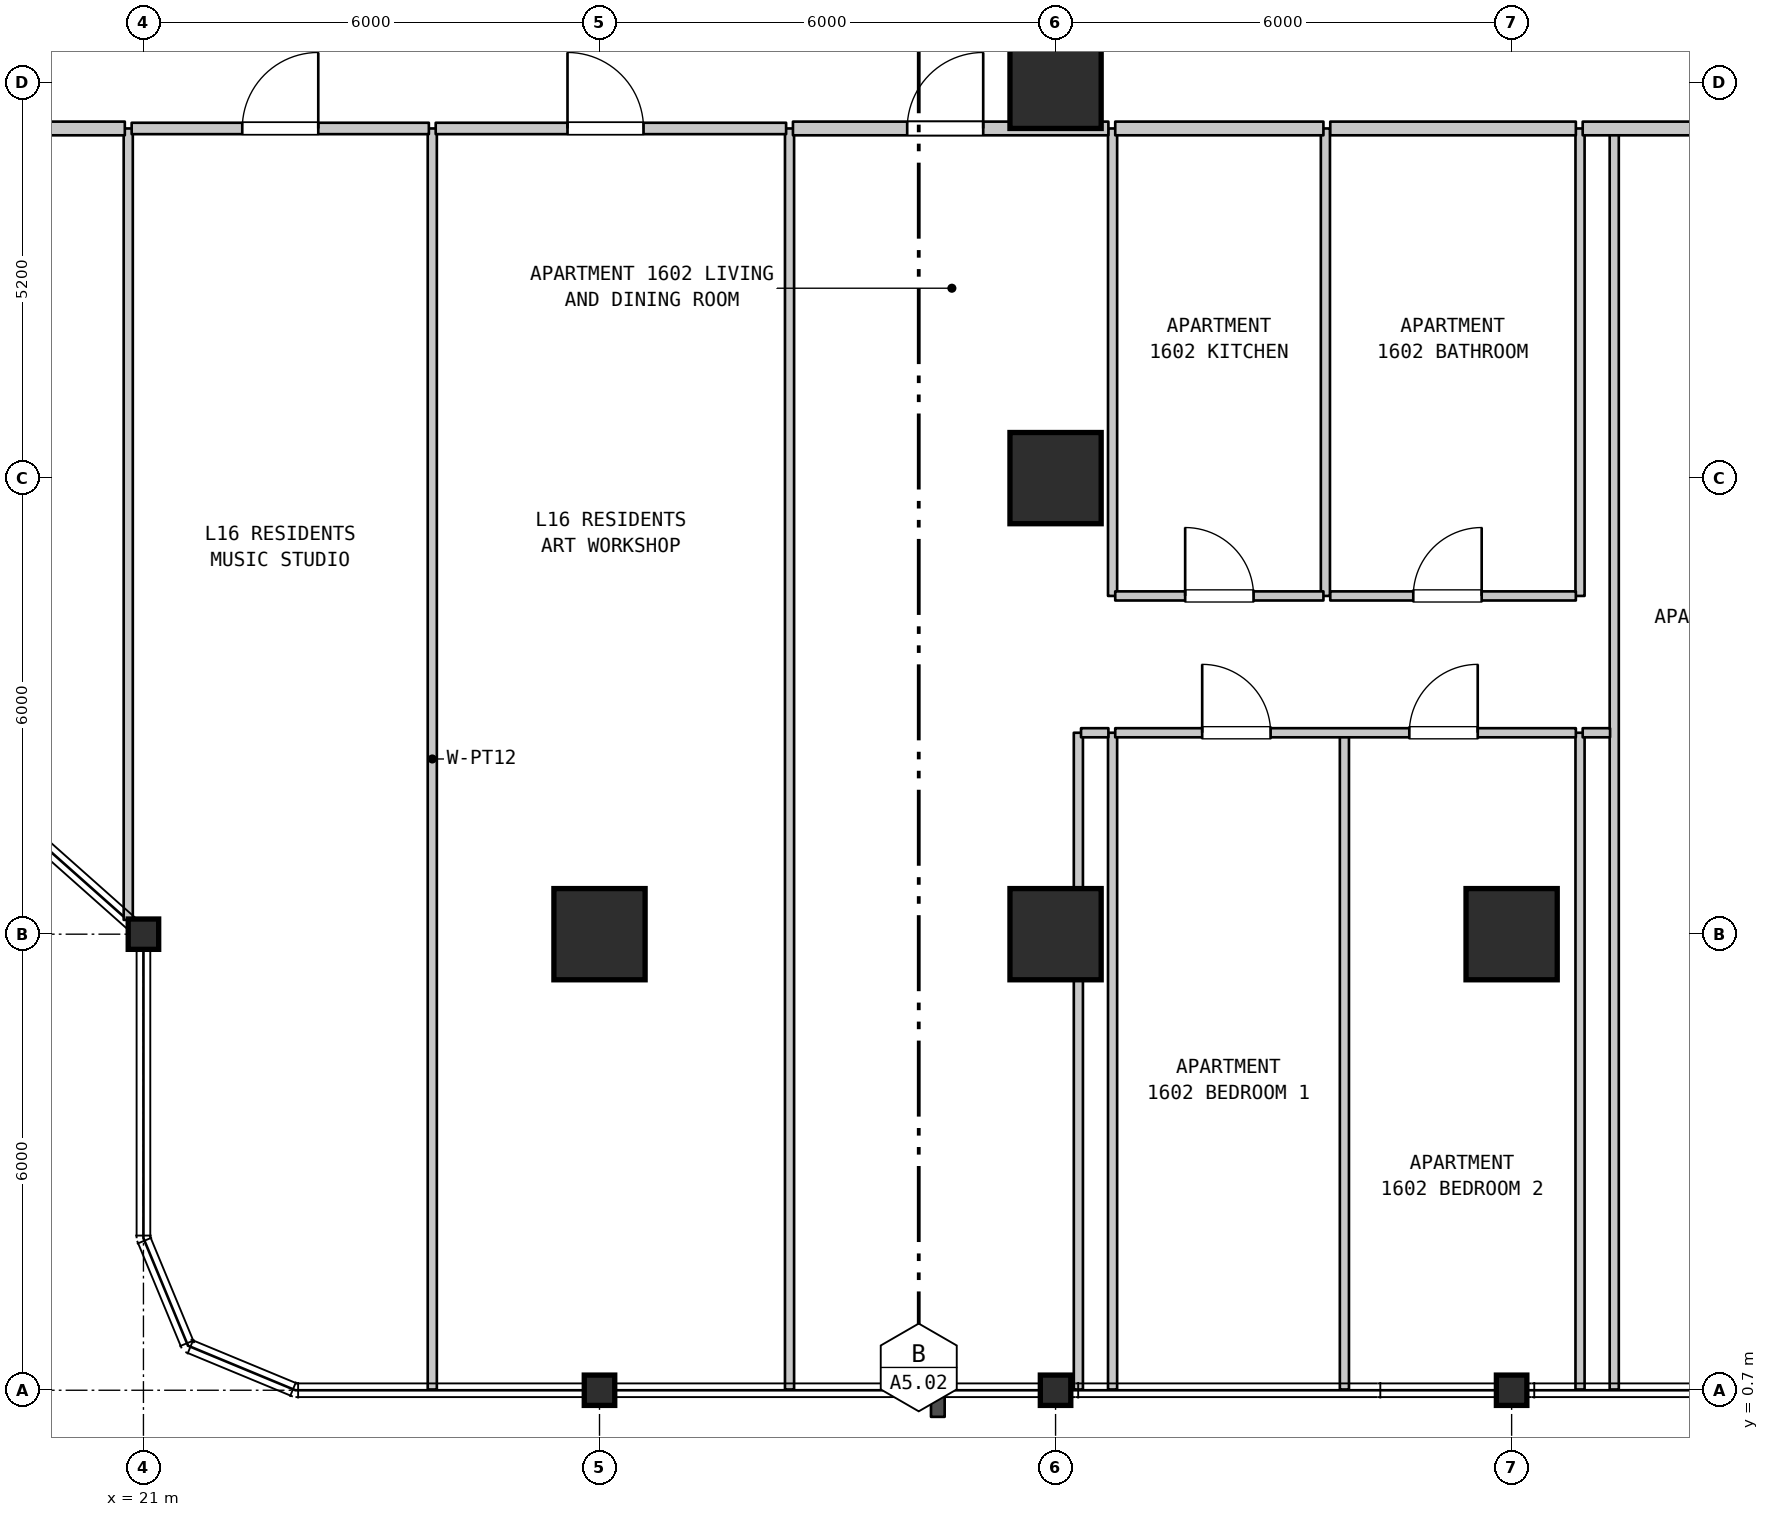
"""IFC4 building model, lengths in metres.
Left out: names, types, materials, properties, quantities, classifications, styles, units other than length and angle.
Written with IfcOpenShell. Run it as: python <this file> out.ifc"""

import sys

from ifc_helpers import new_model, si_unit, direction, frame, frame_2d, origin, origin_2d, place, context, subcontext, project, spatial, rectangle, i_section, extrude, element, fill, save


model = new_model("IFC4")
c1 = context("Model", 3, precision=1e-05, world=origin(), true_north=direction((0.0, 1.0)))
c2 = subcontext(c1, "Body", "Model", "MODEL_VIEW")
j1 = project(units=[si_unit("LENGTHUNIT", "METRE"), si_unit("PLANEANGLEUNIT", "RADIAN")], contexts=[c1])
p1 = place(None, origin())
s1 = spatial("IfcSite", under=j1, at=p1, CompositionType="ELEMENT")
p2 = place(p1, origin())
s2 = spatial("IfcBuilding", under=s1, at=p2, CompositionType="ELEMENT")
p3 = place(p2, frame((0.0, 0.0, 70.1)))
s3 = spatial("IfcBuildingStorey", under=s2, at=p3, CompositionType="ELEMENT", Elevation=70.1)
for number, where, z_axis, x_axis in (
    (1, (21.0, 6.7, 0.0), (0.0, 0.0, 1.0), (1.0, 0.0, 0.0)),
    (2, (27.0, 0.7, 0.0), (0.0, 0.0, 1.0), (1.0, 0.0, 0.0)),
):
    element("IfcColumn", number, at=place(p3, frame(where, z_axis=z_axis, x_axis=x_axis)), inside=s3, PredefinedType="COLUMN", context=c2, shape_type="SweptSolid", body=[
        extrude(i_section(OverallWidth=0.401, OverallDepth=0.399, WebThickness=0.025, FlangeThickness=0.04, FilletRadius=0.015, at=origin_2d()), origin(), (0.0, 0.0, 1.0), 3.7),
    ])
p4 = place(p3, frame((27.0, 6.7, 0.0), z_axis=(0.0, 0.0, 1.0), x_axis=(1.0, 0.0, 0.0)))
e3 = element("IfcColumn", 3, at=p4, inside=s3, PredefinedType="COLUMN", context=c2, shape_type="SweptSolid", body=[
    extrude(rectangle(XDim=1.2, YDim=1.2, at=origin_2d()), origin(), (0.0, 0.0, 1.0), 3.7),
])
p5 = place(p3, frame((33.0, 0.7, 0.0), z_axis=(0.0, 0.0, 1.0), x_axis=(1.0, 0.0, 0.0)))
e4 = element("IfcColumn", 4, at=p5, inside=s3, PredefinedType="COLUMN", context=c2, shape_type="SweptSolid", body=[
    extrude(i_section(OverallWidth=0.401, OverallDepth=0.399, WebThickness=0.025, FlangeThickness=0.04, FilletRadius=0.015, at=origin_2d()), origin(), (0.0, 0.0, 1.0), 3.7),
])
for number, where, z_axis, x_axis in (
    (5, (33.0, 6.7, 0.0), (0.0, 0.0, 1.0), (1.0, 0.0, 0.0)),
    (6, (33.0, 12.7, 0.0), (0.0, 0.0, 1.0), (1.0, 0.0, 0.0)),
    (7, (33.0, 17.9, 0.0), (0.0, 0.0, 1.0), (1.0, 0.0, 0.0)),
):
    element("IfcColumn", number, at=place(p3, frame(where, z_axis=z_axis, x_axis=x_axis)), inside=s3, PredefinedType="COLUMN", context=c2, shape_type="SweptSolid", body=[
        extrude(rectangle(XDim=1.2, YDim=1.2, at=origin_2d()), origin(), (0.0, 0.0, 1.0), 3.7),
    ])
p6 = place(p3, frame((39.0, 0.7, 0.0), z_axis=(0.0, 0.0, 1.0), x_axis=(1.0, 0.0, 0.0)))
e8 = element("IfcColumn", 8, at=p6, inside=s3, PredefinedType="COLUMN", context=c2, shape_type="SweptSolid", body=[
    extrude(i_section(OverallWidth=0.401, OverallDepth=0.399, WebThickness=0.025, FlangeThickness=0.04, FilletRadius=0.015, at=origin_2d()), origin(), (0.0, 0.0, 1.0), 3.7),
])
p7 = place(p3, frame((39.0, 6.7, 0.0), z_axis=(0.0, 0.0, 1.0), x_axis=(1.0, 0.0, 0.0)))
e9 = element("IfcColumn", 9, at=p7, inside=s3, PredefinedType="COLUMN", context=c2, shape_type="SweptSolid", body=[
    extrude(rectangle(XDim=1.2, YDim=1.2, at=origin_2d()), origin(), (0.0, 0.0, 1.0), 3.7),
])
p8 = place(p3, frame((20.8, 6.888, 0.0), z_axis=(0.0, 0.0, 1.0), x_axis=(0.0, 1.0, 0.0)))
e10 = element("IfcWall", 10, at=p8, inside=s3, PredefinedType="PARTITIONING", context=c2, shape_type="SweptSolid", body=[
    extrude(rectangle(XDim=10.412, YDim=0.12, at=frame_2d((5.206, 0.0))), origin(), (0.0, 0.0, 1.0), 3.385),
])
for number, where, z_axis, x_axis in (
    (11, (24.8, 0.71, 0.0), (0.0, 0.0, 1.0), (0.0, 1.0, 0.0)),
    (12, (29.5, 0.71, 0.0), (0.0, 0.0, 1.0), (0.0, 1.0, 0.0)),
):
    element("IfcWall", number, at=place(p3, frame(where, z_axis=z_axis, x_axis=x_axis)), inside=s3, PredefinedType="PARTITIONING", context=c2, shape_type="SweptSolid", body=[
        extrude(rectangle(XDim=16.59, YDim=0.12, at=frame_2d((8.295, 0.0))), origin(), (0.0, 0.0, 1.0), 3.385),
    ])
for number, where, z_axis, x_axis in (
    (13, (33.3, 0.71, 0.0), (0.0, 0.0, 1.0), (0.0, 1.0, 0.0)),
    (14, (33.75, 0.71, 0.0), (0.0, 0.0, 1.0), (0.0, 1.0, 0.0)),
):
    element("IfcWall", number, at=place(p3, frame(where, z_axis=z_axis, x_axis=x_axis)), inside=s3, PredefinedType="PARTITIONING", context=c2, shape_type="SweptSolid", body=[
        extrude(rectangle(XDim=8.64, YDim=0.12, at=frame_2d((4.32, 0.0))), origin(), (0.0, 0.0, 1.0), 3.385),
    ])
for number, where, z_axis, x_axis in (
    (15, (33.75, 11.15, 0.0), (0.0, 0.0, 1.0), (0.0, 1.0, 0.0)),
    (16, (36.55, 11.15, 0.0), (0.0, 0.0, 1.0), (0.0, 1.0, 0.0)),
):
    element("IfcWall", number, at=place(p3, frame(where, z_axis=z_axis, x_axis=x_axis)), inside=s3, PredefinedType="PARTITIONING", context=c2, shape_type="SweptSolid", body=[
        extrude(rectangle(XDim=6.15, YDim=0.12, at=frame_2d((3.075, 0.0))), origin(), (0.0, 0.0, 1.0), 3.385),
    ])
for number, where, z_axis, x_axis in (
    (17, (36.8, 0.71, 0.0), (0.0, 0.0, 1.0), (0.0, 1.0, 0.0)),
    (18, (39.9, 0.71, 0.0), (0.0, 0.0, 1.0), (0.0, 1.0, 0.0)),
):
    element("IfcWall", number, at=place(p3, frame(where, z_axis=z_axis, x_axis=x_axis)), inside=s3, PredefinedType="PARTITIONING", context=c2, shape_type="SweptSolid", body=[
        extrude(rectangle(XDim=8.64, YDim=0.12, at=frame_2d((4.32, 0.0))), origin(), (0.0, 0.0, 1.0), 3.385),
    ])
p9 = place(p3, frame((39.9, 11.15, 0.0), z_axis=(0.0, 0.0, 1.0), x_axis=(0.0, 1.0, 0.0)))
e19 = element("IfcWall", 19, at=p9, inside=s3, PredefinedType="PARTITIONING", context=c2, shape_type="SweptSolid", body=[
    extrude(rectangle(XDim=6.15, YDim=0.12, at=frame_2d((3.075, 0.0))), origin(), (0.0, 0.0, 1.0), 3.385),
])
p10 = place(p3, frame((40.35, 0.71, 0.0), z_axis=(0.0, 0.0, 1.0), x_axis=(0.0, 1.0, 0.0)))
e20 = element("IfcWall", 20, at=p10, inside=s3, PredefinedType="PARTITIONING", context=c2, shape_type="SweptSolid", body=[
    extrude(rectangle(XDim=16.59, YDim=0.12, at=frame_2d((8.295, 0.0))), origin(), (0.0, 0.0, 1.0), 3.385),
])
p11 = place(p3, frame((33.335, 9.35, 0.0), z_axis=(0.0, 0.0, 1.0), x_axis=(1.0, 0.0, 0.0)))
e21 = element("IfcWall", 21, at=p11, inside=s3, PredefinedType="PARTITIONING", context=c2, shape_type="SweptSolid", body=[
    extrude(rectangle(XDim=0.36, YDim=0.12, at=frame_2d((0.18, 0.0))), origin(), (0.0, 0.0, 1.0), 3.385),
])
p12 = place(p3, frame((33.785, 9.35, 0.0), z_axis=(0.0, 0.0, 1.0), x_axis=(1.0, 0.0, 0.0)))
e22 = element("IfcWall", 22, at=p12, inside=s3, PredefinedType="PARTITIONING", context=c2, shape_type="SweptSolid", body=[
    extrude(rectangle(XDim=6.06, YDim=0.12, at=frame_2d((3.03, 0.0))), origin(), (0.0, 0.0, 1.0), 3.385),
])
p13 = place(p12, frame((1.144, 0.0, 0.0)))
e23 = element("IfcOpeningElement", 23, at=p13, cuts=e22, PredefinedType="OPENING", context=c2, shape_type="SweptSolid", body=[
    extrude(rectangle(XDim=0.9, YDim=2.15, at=frame_2d((0.45, 1.075))), frame((0.0, 0.07, 0.0), z_axis=(0.0, -1.0, 0.0), x_axis=(1.0, 0.0, 0.0)), (0.0, 0.0, 1.0), 0.14),
])
p14 = place(p12, frame((3.869, 0.0, 0.0)))
e24 = element("IfcOpeningElement", 24, at=p14, cuts=e22, PredefinedType="OPENING", context=c2, shape_type="SweptSolid", body=[
    extrude(rectangle(XDim=0.9, YDim=2.15, at=frame_2d((0.45, 1.075))), frame((0.0, 0.07, 0.0), z_axis=(0.0, -1.0, 0.0), x_axis=(1.0, 0.0, 0.0)), (0.0, 0.0, 1.0), 0.14),
])
p15 = place(p3, frame((39.935, 9.35, 0.0), z_axis=(0.0, 0.0, 1.0), x_axis=(1.0, 0.0, 0.0)))
e25 = element("IfcWall", 25, at=p15, inside=s3, PredefinedType="PARTITIONING", context=c2, shape_type="SweptSolid", body=[
    extrude(rectangle(XDim=0.36, YDim=0.12, at=frame_2d((0.18, 0.0))), origin(), (0.0, 0.0, 1.0), 3.385),
])
p16 = place(p3, frame((33.785, 11.15, 0.0), z_axis=(0.0, 0.0, 1.0), x_axis=(1.0, 0.0, 0.0)))
e26 = element("IfcWall", 26, at=p16, inside=s3, PredefinedType="PARTITIONING", context=c2, shape_type="SweptSolid", body=[
    extrude(rectangle(XDim=2.739, YDim=0.12, at=frame_2d((1.37, 0.0))), origin(), (0.0, 0.0, 1.0), 3.385),
])
p17 = place(p16, frame((0.92, 0.0, 0.0)))
e27 = element("IfcOpeningElement", 27, at=p17, cuts=e26, PredefinedType="OPENING", context=c2, shape_type="SweptSolid", body=[
    extrude(rectangle(XDim=0.9, YDim=2.15, at=frame_2d((0.45, 1.075))), frame((0.0, 0.07, 0.0), z_axis=(0.0, -1.0, 0.0), x_axis=(1.0, 0.0, 0.0)), (0.0, 0.0, 1.0), 0.14),
])
p18 = place(p3, frame((36.614, 11.15, 0.0), z_axis=(0.0, 0.0, 1.0), x_axis=(1.0, 0.0, 0.0)))
e28 = element("IfcWall", 28, at=p18, inside=s3, PredefinedType="PARTITIONING", context=c2, shape_type="SweptSolid", body=[
    extrude(rectangle(XDim=3.231, YDim=0.12, at=frame_2d((1.615, 0.0))), origin(), (0.0, 0.0, 1.0), 3.385),
])
p19 = place(p18, frame((1.092, 0.0, 0.0)))
e29 = element("IfcOpeningElement", 29, at=p19, cuts=e28, PredefinedType="OPENING", context=c2, shape_type="SweptSolid", body=[
    extrude(rectangle(XDim=0.9, YDim=2.1, at=frame_2d((0.45, 1.05))), frame((0.0, 0.07, 0.0), z_axis=(0.0, -1.0, 0.0), x_axis=(1.0, 0.0, 0.0)), (0.0, 0.0, 1.0), 0.14),
])
p20 = place(p3, frame((18.895, 17.3, 0.0), z_axis=(0.0, 0.0, 1.0), x_axis=(1.0, 0.0, 0.0)))
e30 = element("IfcWall", 30, at=p20, inside=s3, PredefinedType="STANDARD", context=c2, shape_type="SweptSolid", body=[
    extrude(rectangle(XDim=1.86, YDim=0.18, at=frame_2d((0.93, 0.0))), origin(), (0.0, 0.0, 1.0), 3.385),
])
p21 = place(p3, frame((20.845, 17.3, 0.0), z_axis=(0.0, 0.0, 1.0), x_axis=(1.0, 0.0, 0.0)))
e31 = element("IfcWall", 31, at=p21, inside=s3, PredefinedType="STANDARD", context=c2, shape_type="SweptSolid", body=[
    extrude(rectangle(XDim=3.91, YDim=0.15, at=frame_2d((1.955, 0.0))), origin(), (0.0, 0.0, 1.0), 3.385),
])
p22 = place(p21, frame((1.455, 0.0, 0.0)))
e32 = element("IfcOpeningElement", 32, at=p22, cuts=e31, PredefinedType="OPENING", context=c2, shape_type="SweptSolid", body=[
    extrude(rectangle(XDim=1.0, YDim=2.15, at=frame_2d((0.5, 1.075))), frame((0.0, 0.085, 0.0), z_axis=(0.0, -1.0, 0.0), x_axis=(1.0, 0.0, 0.0)), (0.0, 0.0, 1.0), 0.17),
])
p23 = place(p3, frame((24.845, 17.3, 0.0), z_axis=(0.0, 0.0, 1.0), x_axis=(1.0, 0.0, 0.0)))
e33 = element("IfcWall", 33, at=p23, inside=s3, PredefinedType="STANDARD", context=c2, shape_type="SweptSolid", body=[
    extrude(rectangle(XDim=4.61, YDim=0.15, at=frame_2d((2.305, 0.0))), origin(), (0.0, 0.0, 1.0), 3.385),
])
p24 = place(p23, frame((1.734, 0.0, 0.0)))
e34 = element("IfcOpeningElement", 34, at=p24, cuts=e33, PredefinedType="OPENING", context=c2, shape_type="SweptSolid", body=[
    extrude(rectangle(XDim=1.0, YDim=2.15, at=frame_2d((0.5, 1.075))), frame((0.0, 0.085, 0.0), z_axis=(0.0, -1.0, 0.0), x_axis=(1.0, 0.0, 0.0)), (0.0, 0.0, 1.0), 0.17),
])
p25 = place(p3, frame((29.545, 17.3, 0.0), z_axis=(0.0, 0.0, 1.0), x_axis=(1.0, 0.0, 0.0)))
e35 = element("IfcWall", 35, at=p25, inside=s3, PredefinedType="STANDARD", context=c2, shape_type="SweptSolid", body=[
    extrude(rectangle(XDim=4.15, YDim=0.18, at=frame_2d((2.075, 0.0))), origin(), (0.0, 0.0, 1.0), 3.385),
])
p26 = place(p25, frame((1.503, 0.0, 0.0)))
e36 = element("IfcOpeningElement", 36, at=p26, cuts=e35, PredefinedType="OPENING", context=c2, shape_type="SweptSolid", body=[
    extrude(rectangle(XDim=1.0, YDim=2.15, at=frame_2d((0.5, 1.075))), frame((0.0, 0.1, 0.0), z_axis=(0.0, -1.0, 0.0), x_axis=(1.0, 0.0, 0.0)), (0.0, 0.0, 1.0), 0.2),
])
p27 = place(p3, frame((33.785, 17.3, 0.0), z_axis=(0.0, 0.0, 1.0), x_axis=(1.0, 0.0, 0.0)))
e37 = element("IfcWall", 37, at=p27, inside=s3, PredefinedType="STANDARD", context=c2, shape_type="SweptSolid", body=[
    extrude(rectangle(XDim=2.739, YDim=0.18, at=frame_2d((1.37, 0.0))), origin(), (0.0, 0.0, 1.0), 3.385),
])
p28 = place(p3, frame((36.614, 17.3, 0.0), z_axis=(0.0, 0.0, 1.0), x_axis=(1.0, 0.0, 0.0)))
e38 = element("IfcWall", 38, at=p28, inside=s3, PredefinedType="STANDARD", context=c2, shape_type="SweptSolid", body=[
    extrude(rectangle(XDim=3.231, YDim=0.18, at=frame_2d((1.615, 0.0))), origin(), (0.0, 0.0, 1.0), 3.385),
])
p29 = place(p3, frame((39.935, 17.3, 0.0), z_axis=(0.0, 0.0, 1.0), x_axis=(1.0, 0.0, 0.0)))
e39 = element("IfcWall", 39, at=p29, inside=s3, PredefinedType="STANDARD", context=c2, shape_type="SweptSolid", body=[
    extrude(rectangle(XDim=4.64, YDim=0.18, at=frame_2d((2.32, 0.0))), origin(), (0.0, 0.0, 1.0), 3.385),
])
p30 = place(p29, frame((2.02, 0.0, 0.0)))
e40 = element("IfcOpeningElement", 40, at=p30, cuts=e39, PredefinedType="OPENING", context=c2, shape_type="SweptSolid", body=[
    extrude(rectangle(XDim=1.0, YDim=2.15, at=frame_2d((0.5, 1.075))), frame((0.0, 0.1, 0.0), z_axis=(0.0, -1.0, 0.0), x_axis=(1.0, 0.0, 0.0)), (0.0, 0.0, 1.0), 0.2),
])
p31 = place(p13, origin())
e41 = element("IfcDoor", 41, at=p31, inside=s3, OperationType="SINGLE_SWING_LEFT", PredefinedType="DOOR", context=c2, shape_type="SweptSolid", body=[
    extrude(rectangle(XDim=0.9, YDim=2.15, at=frame_2d((0.45, 1.075))), frame((0.0, 0.025, 0.0), z_axis=(0.0, -1.0, 0.0), x_axis=(1.0, 0.0, 0.0)), (0.0, 0.0, 1.0), 0.05),
])
fill(e23, e41)
p32 = place(p14, origin())
e42 = element("IfcDoor", 42, at=p32, inside=s3, OperationType="SINGLE_SWING_RIGHT", PredefinedType="DOOR", context=c2, shape_type="SweptSolid", body=[
    extrude(rectangle(XDim=0.9, YDim=2.15, at=frame_2d((0.45, 1.075))), frame((0.0, 0.025, 0.0), z_axis=(0.0, -1.0, 0.0), x_axis=(1.0, 0.0, 0.0)), (0.0, 0.0, 1.0), 0.05),
])
fill(e24, e42)
p33 = place(p17, origin())
e43 = element("IfcDoor", 43, at=p33, inside=s3, OperationType="SINGLE_SWING_LEFT", PredefinedType="DOOR", context=c2, shape_type="SweptSolid", body=[
    extrude(rectangle(XDim=0.9, YDim=2.15, at=frame_2d((0.45, 1.075))), frame((0.0, 0.025, 0.0), z_axis=(0.0, -1.0, 0.0), x_axis=(1.0, 0.0, 0.0)), (0.0, 0.0, 1.0), 0.05),
])
fill(e27, e43)
p34 = place(p19, origin())
e44 = element("IfcDoor", 44, at=p34, inside=s3, OperationType="SINGLE_SWING_RIGHT", PredefinedType="DOOR", context=c2, shape_type="SweptSolid", body=[
    extrude(rectangle(XDim=0.9, YDim=2.1, at=frame_2d((0.45, 1.05))), frame((0.0, 0.025, 0.0), z_axis=(0.0, -1.0, 0.0), x_axis=(1.0, 0.0, 0.0)), (0.0, 0.0, 1.0), 0.05),
])
fill(e29, e44)
p35 = place(p22, origin())
e45 = element("IfcDoor", 45, at=p35, inside=s3, OperationType="SINGLE_SWING_RIGHT", PredefinedType="DOOR", context=c2, shape_type="SweptSolid", body=[
    extrude(rectangle(XDim=1.0, YDim=2.15, at=frame_2d((0.5, 1.075))), frame((0.0, 0.025, 0.0), z_axis=(0.0, -1.0, 0.0), x_axis=(1.0, 0.0, 0.0)), (0.0, 0.0, 1.0), 0.05),
])
fill(e32, e45)
p36 = place(p24, origin())
e46 = element("IfcDoor", 46, at=p36, inside=s3, OperationType="SINGLE_SWING_LEFT", PredefinedType="DOOR", context=c2, shape_type="SweptSolid", body=[
    extrude(rectangle(XDim=1.0, YDim=2.15, at=frame_2d((0.5, 1.075))), frame((0.0, 0.025, 0.0), z_axis=(0.0, -1.0, 0.0), x_axis=(1.0, 0.0, 0.0)), (0.0, 0.0, 1.0), 0.05),
])
fill(e34, e46)
p37 = place(p26, origin())
e47 = element("IfcDoor", 47, at=p37, inside=s3, OperationType="SINGLE_SWING_RIGHT", PredefinedType="DOOR", context=c2, shape_type="SweptSolid", body=[
    extrude(rectangle(XDim=1.0, YDim=2.15, at=frame_2d((0.5, 1.075))), frame((0.0, 0.025, 0.0), z_axis=(0.0, -1.0, 0.0), x_axis=(1.0, 0.0, 0.0)), (0.0, 0.0, 1.0), 0.05),
])
fill(e36, e47)
save(model, sys.argv[1])
